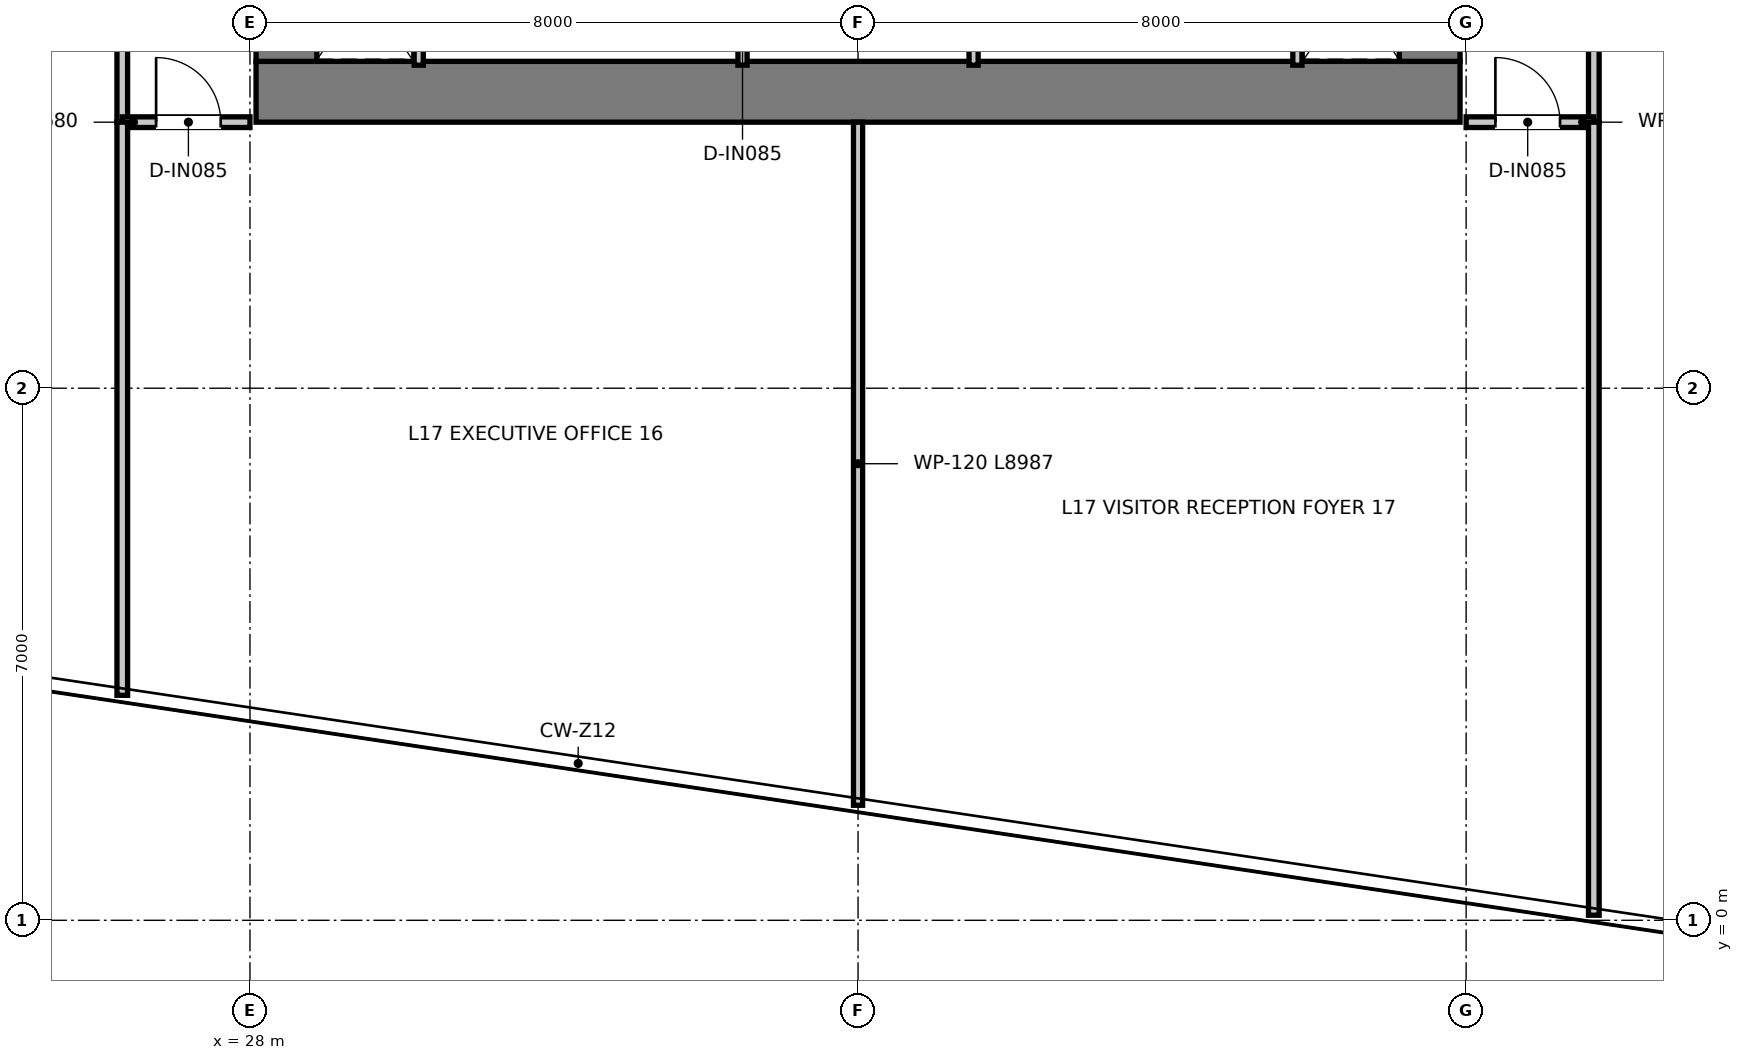
"""IFC4 building model, lengths in metres.
Left out: names, types, materials, properties, quantities, classifications, styles, units other than length and angle.
Written with IfcOpenShell. Run it as: python <this file> out.ifc"""

import sys

from ifc_helpers import new_model, si_unit, direction, frame, frame_2d, origin, place, context, subcontext, project, spatial, rectangle, extrude, element, fill, save


model = new_model("IFC4")
c1 = context("Model", 3, precision=1e-05, world=origin(), true_north=direction((0.0, 1.0)))
c2 = subcontext(c1, "Body", "Model", "MODEL_VIEW")
j1 = project(units=[si_unit("LENGTHUNIT", "METRE"), si_unit("PLANEANGLEUNIT", "RADIAN")], contexts=[c1])
p1 = place(None, origin())
s1 = spatial("IfcSite", under=j1, at=p1, CompositionType="ELEMENT")
p2 = place(p1, origin())
s2 = spatial("IfcBuilding", under=s1, at=p2, CompositionType="ELEMENT")
p3 = place(p2, frame((0.0, 0.0, 72.4)))
s3 = spatial("IfcBuildingStorey", under=s2, at=p3, CompositionType="ELEMENT", Elevation=72.4)
p4 = place(p3, frame((28.08, 10.9, 0.0), z_axis=(0.0, 0.0, 1.0), x_axis=(1.0, 0.0, 0.0)))
e1 = element("IfcWall", 1, at=p4, inside=s3, PredefinedType="SHEAR", context=c2, shape_type="SweptSolid", body=[
    extrude(rectangle(XDim=15.84, YDim=0.8, at=frame_2d((7.92, 0.0))), origin(), (0.0, 0.0, 1.0), 3.95),
])
for number, where, z_axis, x_axis in (
    (2, (28.48, 11.3, 0.0), (0.0, 0.0, 1.0), (0.0, 1.0, 0.0)),
    (3, (43.52, 11.3, 0.0), (0.0, 0.0, 1.0), (0.0, 1.0, 0.0)),
):
    element("IfcWall", number, at=place(p3, frame(where, z_axis=z_axis, x_axis=x_axis)), inside=s3, PredefinedType="SHEAR", context=c2, shape_type="SweptSolid", body=[
        extrude(rectangle(XDim=14.7, YDim=0.8, at=frame_2d((7.35, 0.0))), origin(), (0.0, 0.0, 1.0), 3.95),
    ])
for number, where, z_axis, x_axis in (
    (4, (30.22, 11.25, 0.0), (0.0, 0.0, 1.0), (0.0, 1.0, 0.0)),
    (5, (41.78, 11.25, 0.0), (0.0, 0.0, 1.0), (0.0, 1.0, 0.0)),
):
    element("IfcWall", number, at=place(p3, frame(where, z_axis=z_axis, x_axis=x_axis)), inside=s3, PredefinedType="PARTITIONING", context=c2, shape_type="SweptSolid", body=[
        extrude(rectangle(XDim=1.97, YDim=0.12, at=frame_2d((0.985, 0.0))), origin(), (0.0, 0.0, 1.0), 3.67),
    ])
p5 = place(p3, frame((34.48, 11.25, 0.0), z_axis=(0.0, 0.0, 1.0), x_axis=(0.0, 1.0, 0.0)))
e6 = element("IfcWall", 6, at=p5, inside=s3, PredefinedType="PARTITIONING", context=c2, shape_type="SweptSolid", body=[
    extrude(rectangle(XDim=1.97, YDim=0.12, at=frame_2d((0.985, 0.0))), origin(), (0.0, 0.0, 1.0), 3.67),
])
p6 = place(p5, frame((0.545, 0.0, 0.0)))
e7 = element("IfcOpeningElement", 7, at=p6, cuts=e6, PredefinedType="OPENING", context=c2, shape_type="SweptSolid", body=[
    extrude(rectangle(XDim=0.85, YDim=2.1, at=frame_2d((0.425, 1.05))), frame((0.0, 0.07, 0.0), z_axis=(0.0, -1.0, 0.0), x_axis=(1.0, 0.0, 0.0)), (0.0, 0.0, 1.0), 0.14),
])
p7 = place(p3, frame((37.52, 11.25, 0.0), z_axis=(0.0, 0.0, 1.0), x_axis=(0.0, 1.0, 0.0)))
e8 = element("IfcWall", 8, at=p7, inside=s3, PredefinedType="PARTITIONING", context=c2, shape_type="SweptSolid", body=[
    extrude(rectangle(XDim=1.97, YDim=0.12, at=frame_2d((0.985, 0.0))), origin(), (0.0, 0.0, 1.0), 3.67),
])
p8 = place(p7, frame((0.545, 0.0, 0.0)))
e9 = element("IfcOpeningElement", 9, at=p8, cuts=e8, PredefinedType="OPENING", context=c2, shape_type="SweptSolid", body=[
    extrude(rectangle(XDim=0.85, YDim=2.1, at=frame_2d((0.425, 1.05))), frame((0.0, 0.07, 0.0), z_axis=(0.0, -1.0, 0.0), x_axis=(1.0, 0.0, 0.0)), (0.0, 0.0, 1.0), 0.14),
])
p9 = place(p3, frame((26.32, 10.5, 0.0), z_axis=(0.0, 0.0, 1.0), x_axis=(0.0, 1.0, 0.0)))
e10 = element("IfcWall", 10, at=p9, inside=s3, PredefinedType="PARTITIONING", context=c2, shape_type="SweptSolid", body=[
    extrude(rectangle(XDim=25.62, YDim=0.14, at=frame_2d((12.81, 0.0))), origin(), (0.0, 0.0, 1.0), 2.97),
])
p10 = place(p9, frame((7.775, 0.0, 0.0)))
e11 = element("IfcOpeningElement", 11, at=p10, cuts=e10, PredefinedType="OPENING", context=c2, shape_type="SweptSolid", body=[
    extrude(rectangle(XDim=0.95, YDim=2.1, at=frame_2d((0.475, 1.05))), frame((0.0, 0.08, 0.0), z_axis=(0.0, -1.0, 0.0), x_axis=(1.0, 0.0, 0.0)), (0.0, 0.0, 1.0), 0.16),
])
p11 = place(p9, frame((11.275, 0.0, 0.0)))
e12 = element("IfcOpeningElement", 12, at=p11, cuts=e10, PredefinedType="OPENING", context=c2, shape_type="SweptSolid", body=[
    extrude(rectangle(XDim=0.95, YDim=2.1, at=frame_2d((0.475, 1.05))), frame((0.0, 0.08, 0.0), z_axis=(0.0, -1.0, 0.0), x_axis=(1.0, 0.0, 0.0)), (0.0, 0.0, 1.0), 0.16),
])
p12 = place(p9, frame((15.775, 0.0, 0.0)))
e13 = element("IfcOpeningElement", 13, at=p12, cuts=e10, PredefinedType="OPENING", context=c2, shape_type="SweptSolid", body=[
    extrude(rectangle(XDim=0.95, YDim=2.1, at=frame_2d((0.475, 1.05))), frame((0.0, 0.08, 0.0), z_axis=(0.0, -1.0, 0.0), x_axis=(1.0, 0.0, 0.0)), (0.0, 0.0, 1.0), 0.16),
])
p13 = place(p9, frame((20.125, 0.0, 0.0)))
e14 = element("IfcOpeningElement", 14, at=p13, cuts=e10, PredefinedType="OPENING", context=c2, shape_type="SweptSolid", body=[
    extrude(rectangle(XDim=0.95, YDim=2.1, at=frame_2d((0.475, 1.05))), frame((0.0, 0.08, 0.0), z_axis=(0.0, -1.0, 0.0), x_axis=(1.0, 0.0, 0.0)), (0.0, 0.0, 1.0), 0.16),
])
p14 = place(p9, frame((22.975, 0.0, 0.0)))
e15 = element("IfcOpeningElement", 15, at=p14, cuts=e10, PredefinedType="OPENING", context=c2, shape_type="SweptSolid", body=[
    extrude(rectangle(XDim=0.95, YDim=2.1, at=frame_2d((0.475, 1.05))), frame((0.0, 0.08, 0.0), z_axis=(0.0, -1.0, 0.0), x_axis=(1.0, 0.0, 0.0)), (0.0, 0.0, 1.0), 0.16),
])
p15 = place(p3, frame((45.68, 10.5, 0.0), z_axis=(0.0, 0.0, 1.0), x_axis=(0.0, 1.0, 0.0)))
e16 = element("IfcWall", 16, at=p15, inside=s3, PredefinedType="PARTITIONING", context=c2, shape_type="SweptSolid", body=[
    extrude(rectangle(XDim=25.62, YDim=0.14, at=frame_2d((12.81, 0.0))), origin(), (0.0, 0.0, 1.0), 2.97),
])
p16 = place(p15, frame((7.775, 0.0, 0.0)))
e17 = element("IfcOpeningElement", 17, at=p16, cuts=e16, PredefinedType="OPENING", context=c2, shape_type="SweptSolid", body=[
    extrude(rectangle(XDim=0.95, YDim=2.1, at=frame_2d((0.475, 1.05))), frame((0.0, 0.08, 0.0), z_axis=(0.0, -1.0, 0.0), x_axis=(1.0, 0.0, 0.0)), (0.0, 0.0, 1.0), 0.16),
])
p17 = place(p15, frame((11.275, 0.0, 0.0)))
e18 = element("IfcOpeningElement", 18, at=p17, cuts=e16, PredefinedType="OPENING", context=c2, shape_type="SweptSolid", body=[
    extrude(rectangle(XDim=0.95, YDim=2.1, at=frame_2d((0.475, 1.05))), frame((0.0, 0.08, 0.0), z_axis=(0.0, -1.0, 0.0), x_axis=(1.0, 0.0, 0.0)), (0.0, 0.0, 1.0), 0.16),
])
p18 = place(p15, frame((15.775, 0.0, 0.0)))
e19 = element("IfcOpeningElement", 19, at=p18, cuts=e16, PredefinedType="OPENING", context=c2, shape_type="SweptSolid", body=[
    extrude(rectangle(XDim=0.95, YDim=2.1, at=frame_2d((0.475, 1.05))), frame((0.0, 0.08, 0.0), z_axis=(0.0, -1.0, 0.0), x_axis=(1.0, 0.0, 0.0)), (0.0, 0.0, 1.0), 0.16),
])
p19 = place(p15, frame((20.125, 0.0, 0.0)))
e20 = element("IfcOpeningElement", 20, at=p19, cuts=e16, PredefinedType="OPENING", context=c2, shape_type="SweptSolid", body=[
    extrude(rectangle(XDim=0.95, YDim=2.1, at=frame_2d((0.475, 1.05))), frame((0.0, 0.08, 0.0), z_axis=(0.0, -1.0, 0.0), x_axis=(1.0, 0.0, 0.0)), (0.0, 0.0, 1.0), 0.16),
])
p20 = place(p15, frame((22.975, 0.0, 0.0)))
e21 = element("IfcOpeningElement", 21, at=p20, cuts=e16, PredefinedType="OPENING", context=c2, shape_type="SweptSolid", body=[
    extrude(rectangle(XDim=0.95, YDim=2.1, at=frame_2d((0.475, 1.05))), frame((0.0, 0.08, 0.0), z_axis=(0.0, -1.0, 0.0), x_axis=(1.0, 0.0, 0.0)), (0.0, 0.0, 1.0), 0.16),
])
p21 = place(p3, frame((26.32, 10.5, 0.0), z_axis=(0.0, 0.0, 1.0), x_axis=(1.0, 0.0, 0.0)))
e22 = element("IfcWall", 22, at=p21, inside=s3, PredefinedType="PARTITIONING", context=c2, shape_type="SweptSolid", body=[
    extrude(rectangle(XDim=1.68, YDim=0.14, at=frame_2d((0.84, 0.0))), origin(), (0.0, 0.0, 1.0), 3.67),
])
p22 = place(p21, frame((0.445, 0.0, 0.0)))
e23 = element("IfcOpeningElement", 23, at=p22, cuts=e22, PredefinedType="OPENING", context=c2, shape_type="SweptSolid", body=[
    extrude(rectangle(XDim=0.85, YDim=2.1, at=frame_2d((0.425, 1.05))), frame((0.0, 0.08, 0.0), z_axis=(0.0, -1.0, 0.0), x_axis=(1.0, 0.0, 0.0)), (0.0, 0.0, 1.0), 0.16),
])
p23 = place(p3, frame((44.0, 10.5, 0.0), z_axis=(0.0, 0.0, 1.0), x_axis=(1.0, 0.0, 0.0)))
e24 = element("IfcWall", 24, at=p23, inside=s3, PredefinedType="PARTITIONING", context=c2, shape_type="SweptSolid", body=[
    extrude(rectangle(XDim=1.68, YDim=0.14, at=frame_2d((0.84, 0.0))), origin(), (0.0, 0.0, 1.0), 3.67),
])
p24 = place(p23, frame((0.385, 0.0, 0.0)))
e25 = element("IfcOpeningElement", 25, at=p24, cuts=e24, PredefinedType="OPENING", context=c2, shape_type="SweptSolid", body=[
    extrude(rectangle(XDim=0.85, YDim=2.1, at=frame_2d((0.425, 1.05))), frame((0.0, 0.08, 0.0), z_axis=(0.0, -1.0, 0.0), x_axis=(1.0, 0.0, 0.0)), (0.0, 0.0, 1.0), 0.16),
])
p25 = place(p3, frame((26.32, 2.96, 0.0), z_axis=(0.0, 0.0, 1.0), x_axis=(0.0, 1.0, 0.0)))
e26 = element("IfcWall", 26, at=p25, inside=s3, PredefinedType="PARTITIONING", context=c2, shape_type="SweptSolid", body=[
    extrude(rectangle(XDim=7.54, YDim=0.14, at=frame_2d((3.77, 0.0))), origin(), (0.0, 0.0, 1.0), 3.67),
])
p26 = place(p3, frame((45.68, 0.067, 0.0), z_axis=(0.0, 0.0, 1.0), x_axis=(0.0, 1.0, 0.0)))
e27 = element("IfcWall", 27, at=p26, inside=s3, PredefinedType="PARTITIONING", context=c2, shape_type="SweptSolid", body=[
    extrude(rectangle(XDim=10.433, YDim=0.14, at=frame_2d((5.217, 0.0))), origin(), (0.0, 0.0, 1.0), 3.67),
])
p27 = place(p3, frame((36.0, 1.513, 0.0), z_axis=(0.0, 0.0, 1.0), x_axis=(0.0, 1.0, 0.0)))
e28 = element("IfcWall", 28, at=p27, inside=s3, PredefinedType="PARTITIONING", context=c2, shape_type="SweptSolid", body=[
    extrude(rectangle(XDim=8.987, YDim=0.12, at=frame_2d((4.493, 0.0))), origin(), (0.0, 0.0, 1.0), 3.67),
])
p28 = place(p22, origin())
e29 = element("IfcDoor", 29, at=p28, inside=s3, OperationType="SINGLE_SWING_LEFT", PredefinedType="DOOR", context=c2, shape_type="SweptSolid", body=[
    extrude(rectangle(XDim=0.85, YDim=2.1, at=frame_2d((0.425, 1.05))), frame((0.0, 0.025, 0.0), z_axis=(0.0, -1.0, 0.0), x_axis=(1.0, 0.0, 0.0)), (0.0, 0.0, 1.0), 0.05),
])
fill(e23, e29)
p29 = place(p24, origin())
e30 = element("IfcDoor", 30, at=p29, inside=s3, OperationType="SINGLE_SWING_LEFT", PredefinedType="DOOR", context=c2, shape_type="SweptSolid", body=[
    extrude(rectangle(XDim=0.85, YDim=2.1, at=frame_2d((0.425, 1.05))), frame((0.0, 0.025, 0.0), z_axis=(0.0, -1.0, 0.0), x_axis=(1.0, 0.0, 0.0)), (0.0, 0.0, 1.0), 0.05),
])
fill(e25, e30)
save(model, sys.argv[1])
